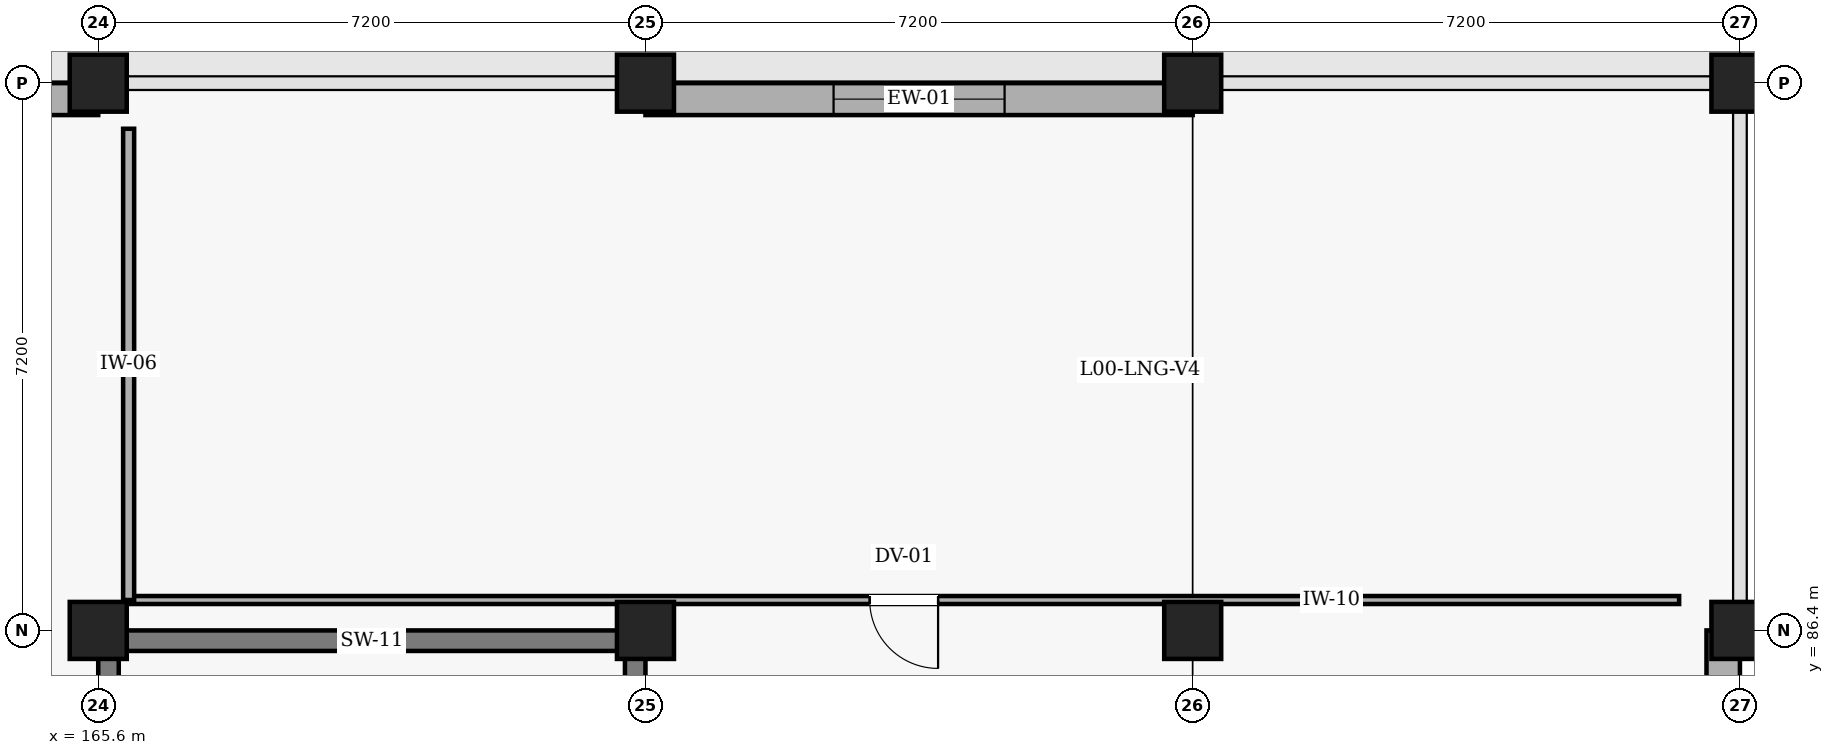
"""IFC4 building model, lengths in metres.
Left out: names, types, materials, properties, quantities, classifications, styles, units other than length and angle.
Written with IfcOpenShell. Run it as: python <this file> out.ifc"""

import sys

from ifc_helpers import new_model, si_unit, direction, frame, frame_2d, origin, origin_2d, place, context, subcontext, project, spatial, rectangle, extrude, element, fill, save


model = new_model("IFC4")
c1 = context("Model", 3, precision=1e-05, world=origin(), true_north=direction((0.0, 1.0)))
c2 = subcontext(c1, "Body", "Model", "MODEL_VIEW")
j1 = project(units=[si_unit("LENGTHUNIT", "METRE"), si_unit("PLANEANGLEUNIT", "RADIAN")], contexts=[c1])
p1 = place(None, origin())
s1 = spatial("IfcSite", under=j1, at=p1, CompositionType="ELEMENT")
p2 = place(p1, origin())
s2 = spatial("IfcBuilding", under=s1, at=p2, CompositionType="ELEMENT")
p3 = place(p2, origin())
s3 = spatial("IfcBuildingStorey", under=s2, at=p3, CompositionType="ELEMENT", Elevation=0.0)
p4 = place(p3, frame((165.6, 86.265, 0.0), z_axis=(0.0, 0.0, 1.0), x_axis=(1.0, 0.0, 0.0)))
e1 = element("IfcWall", 1, at=p4, inside=s3, PredefinedType="SHEAR", context=c2, shape_type="SweptSolid", body=[
    extrude(rectangle(XDim=7.2, YDim=0.27, at=frame_2d((3.6, 0.0))), origin(), (0.0, 0.0, 1.0), 5.4),
])
p5 = place(p3, frame((172.665, 86.13, 0.0), z_axis=(0.0, 0.0, 1.0), x_axis=(0.0, -1.0, 0.0)))
e2 = element("IfcWall", 2, at=p5, inside=s3, PredefinedType="SHEAR", context=c2, shape_type="SweptSolid", body=[
    extrude(rectangle(XDim=13.86, YDim=0.27, at=frame_2d((6.93, 0.0))), origin(), (0.0, 0.0, 1.0), 5.4),
])
p6 = place(p3, frame((165.735, 72.27, 0.0), z_axis=(0.0, 0.0, 1.0), x_axis=(0.0, 1.0, 0.0)))
e3 = element("IfcWall", 3, at=p6, inside=s3, PredefinedType="SHEAR", context=c2, shape_type="SweptSolid", body=[
    extrude(rectangle(XDim=13.86, YDim=0.27, at=frame_2d((6.93, 0.0))), origin(), (0.0, 0.0, 1.0), 5.4),
])
p7 = place(p6, frame((9.8, 0.0, 0.0)))
e4 = element("IfcOpeningElement", 4, at=p7, cuts=e3, PredefinedType="OPENING", context=c2, shape_type="SweptSolid", body=[
    extrude(rectangle(XDim=1.25, YDim=2.2, at=frame_2d((0.625, 1.1))), frame((0.0, 0.145, 0.0), z_axis=(0.0, -1.0, 0.0), x_axis=(1.0, 0.0, 0.0)), (0.0, 0.0, 1.0), 0.29),
])
for number, where, z_axis, x_axis in (
    (5, (165.6, 86.4, 0.0), (0.0, 0.0, 1.0), (1.0, 0.0, 0.0)),
    (6, (165.6, 93.6, 0.0), (0.0, 0.0, 1.0), (1.0, 0.0, 0.0)),
    (7, (172.8, 86.4, 0.0), (0.0, 0.0, 1.0), (1.0, 0.0, 0.0)),
    (8, (172.8, 93.6, 0.0), (0.0, 0.0, 1.0), (1.0, 0.0, 0.0)),
    (9, (180.0, 86.4, 0.0), (0.0, 0.0, 1.0), (1.0, 0.0, 0.0)),
    (10, (180.0, 93.6, 0.0), (0.0, 0.0, 1.0), (1.0, 0.0, 0.0)),
    (11, (187.2, 86.4, 0.0), (0.0, 0.0, 1.0), (1.0, 0.0, 0.0)),
    (12, (187.2, 93.6, 0.0), (0.0, 0.0, 1.0), (1.0, 0.0, 0.0)),
):
    element("IfcColumn", number, at=place(p3, frame(where, z_axis=z_axis, x_axis=x_axis)), inside=s3, PredefinedType="COLUMN", context=c2, shape_type="SweptSolid", body=[
        extrude(rectangle(XDim=0.75, YDim=0.75, at=origin_2d()), origin(), (0.0, 0.0, 1.0), 5.1),
    ])
p8 = place(p3, frame((158.4, 93.39, 0.0), z_axis=(0.0, 0.0, 1.0), x_axis=(1.0, 0.0, 0.0)))
e13 = element("IfcWall", 13, at=p8, inside=s3, PredefinedType="SOLIDWALL", context=c2, shape_type="SweptSolid", body=[
    extrude(rectangle(XDim=7.2, YDim=0.42, at=frame_2d((3.6, 0.0))), origin(), (0.0, 0.0, 1.0), 4.8),
])
p9 = place(p8, frame((2.5, 0.0, 0.0)))
e14 = element("IfcOpeningElement", 14, at=p9, cuts=e13, PredefinedType="OPENING", context=c2, shape_type="SweptSolid", body=[
    extrude(rectangle(XDim=2.2, YDim=2.4, at=frame_2d((1.1, 1.2))), frame((0.0, 0.22, 0.0), z_axis=(0.0, -1.0, 0.0), x_axis=(1.0, 0.0, 0.0)), (0.0, 0.0, 1.0), 0.44),
])
p10 = place(p3, frame((172.8, 93.39, 0.0), z_axis=(0.0, 0.0, 1.0), x_axis=(1.0, 0.0, 0.0)))
e15 = element("IfcWall", 15, at=p10, inside=s3, PredefinedType="SOLIDWALL", context=c2, shape_type="SweptSolid", body=[
    extrude(rectangle(XDim=7.2, YDim=0.42, at=frame_2d((3.6, 0.0))), origin(), (0.0, 0.0, 1.0), 4.8),
])
p11 = place(p10, frame((2.475, 0.0, 0.9)))
e16 = element("IfcOpeningElement", 16, at=p11, cuts=e15, PredefinedType="OPENING", context=c2, shape_type="SweptSolid", body=[
    extrude(rectangle(XDim=2.25, YDim=1.7, at=frame_2d((1.125, 0.85))), frame((0.0, 0.22, 0.0), z_axis=(0.0, -1.0, 0.0), x_axis=(1.0, 0.0, 0.0)), (0.0, 0.0, 1.0), 0.44),
])
p12 = place(p3, frame((186.98, 86.4, 0.0), z_axis=(0.0, 0.0, 1.0), x_axis=(0.0, -1.0, 0.0)))
e17 = element("IfcWall", 17, at=p12, inside=s3, PredefinedType="SOLIDWALL", context=c2, shape_type="SweptSolid", body=[
    extrude(rectangle(XDim=7.2, YDim=0.44, at=frame_2d((3.6, 0.0))), origin(), (0.0, 0.0, 1.0), 4.77),
])
p13 = place(p12, frame((2.425, 0.0, 0.9)))
e18 = element("IfcOpeningElement", 18, at=p13, cuts=e17, PredefinedType="OPENING", context=c2, shape_type="SweptSolid", body=[
    extrude(rectangle(XDim=2.35, YDim=1.5, at=frame_2d((1.175, 0.75))), frame((0.0, 0.23, 0.0), z_axis=(0.0, -1.0, 0.0), x_axis=(1.0, 0.0, 0.0)), (0.0, 0.0, 1.0), 0.46),
])
p14 = place(p3, frame((186.4, 86.8, 0.0), z_axis=(0.0, 0.0, 1.0), x_axis=(-1.0, 0.0, 0.0)))
e19 = element("IfcWall", 19, at=p14, inside=s3, PredefinedType="PARTITIONING", context=c2, shape_type="SweptSolid", body=[
    extrude(rectangle(XDim=20.4, YDim=0.105, at=frame_2d((10.2, 0.0))), origin(), (0.0, 0.0, 1.0), 4.7),
])
p15 = place(p14, frame((9.75, 0.0, 0.0)))
e20 = element("IfcOpeningElement", 20, at=p15, cuts=e19, PredefinedType="OPENING", context=c2, shape_type="SweptSolid", body=[
    extrude(rectangle(XDim=0.9, YDim=2.1, at=frame_2d((0.45, 1.05))), frame((0.0, 0.062, 0.0), z_axis=(0.0, -1.0, 0.0), x_axis=(1.0, 0.0, 0.0)), (0.0, 0.0, 1.0), 0.125),
])
p16 = place(p3, frame((166.0, 86.8, 0.0), z_axis=(0.0, 0.0, 1.0), x_axis=(0.0, 1.0, 0.0)))
e21 = element("IfcWall", 21, at=p16, inside=s3, PredefinedType="PARTITIONING", context=c2, shape_type="SweptSolid", body=[
    extrude(rectangle(XDim=6.2, YDim=0.145, at=frame_2d((3.1, 0.0))), origin(), (0.0, 0.0, 1.0), 4.77),
])
p17 = place(p11, origin())
e22 = element("IfcWindow", 22, at=p17, inside=s3, PartitioningType="SINGLE_PANEL", PredefinedType="WINDOW", context=c2, shape_type="SweptSolid", body=[
    extrude(rectangle(XDim=2.25, YDim=1.7, at=frame_2d((1.125, 0.85))), frame((0.0, 0.03, 0.0), z_axis=(0.0, -1.0, 0.0), x_axis=(1.0, 0.0, 0.0)), (0.0, 0.0, 1.0), 0.06),
])
fill(e16, e22)
p18 = place(p15, origin())
e23 = element("IfcDoor", 23, at=p18, inside=s3, OperationType="SINGLE_SWING_LEFT", PredefinedType="DOOR", context=c2, shape_type="SweptSolid", body=[
    extrude(rectangle(XDim=0.9, YDim=2.1, at=frame_2d((0.45, 1.05))), frame((0.0, 0.025, 0.0), z_axis=(0.0, -1.0, 0.0), x_axis=(1.0, 0.0, 0.0)), (0.0, 0.0, 1.0), 0.05),
])
fill(e20, e23)
save(model, sys.argv[1])
